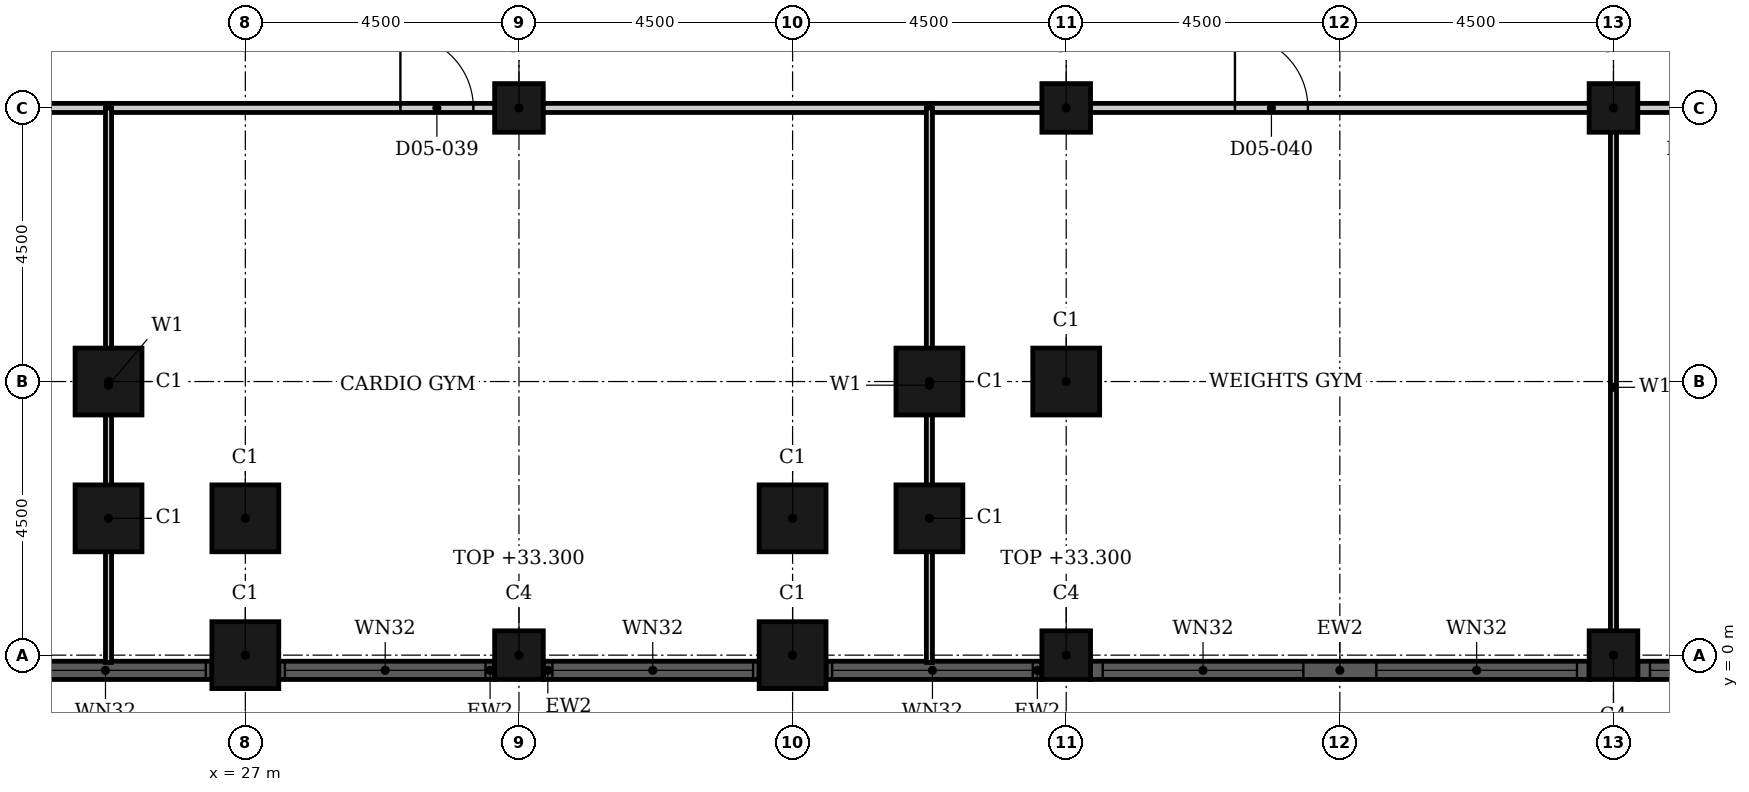
"""IFC4 building model, lengths in metres.
Left out: names, types, materials, properties, quantities, classifications, styles, units other than length and angle.
Written with IfcOpenShell. Run it as: python <this file> out.ifc"""

import sys

from ifc_helpers import new_model, si_unit, direction, frame, frame_2d, origin, origin_2d, place, context, subcontext, project, spatial, rectangle, hollow_rectangle, extrude, element, fill, save


model = new_model("IFC4")
c1 = context("Model", 3, precision=1e-05, world=origin(), true_north=direction((0.0, 1.0)))
c2 = subcontext(c1, "Body", "Model", "MODEL_VIEW")
j1 = project(units=[si_unit("LENGTHUNIT", "METRE"), si_unit("PLANEANGLEUNIT", "RADIAN")], contexts=[c1])
p1 = place(None, origin())
s1 = spatial("IfcSite", under=j1, at=p1, CompositionType="ELEMENT")
p2 = place(p1, origin())
s2 = spatial("IfcBuilding", under=s1, at=p2, CompositionType="ELEMENT")
p3 = place(p2, frame((0.0, 0.0, 28.8)))
s3 = spatial("IfcBuildingStorey", under=s2, at=p3, CompositionType="ELEMENT", Elevation=28.8)
for number, where, z_axis, x_axis in (
    (1, (24.75, 4.5, 0.0), (0.0, 0.0, 1.0), (1.0, 0.0, 0.0)),
    (2, (24.75, 2.25, 0.0), (0.0, 0.0, 1.0), (1.0, 0.0, 0.0)),
    (3, (27.0, 2.25, 0.0), (0.0, 0.0, 1.0), (1.0, 0.0, 0.0)),
    (4, (27.0, 0.0, 0.0), (0.0, 0.0, 1.0), (1.0, 0.0, 0.0)),
    (5, (36.0, 0.0, 0.0), (0.0, 0.0, 1.0), (1.0, 0.0, 0.0)),
    (6, (36.0, 2.25, 0.0), (0.0, 0.0, 1.0), (1.0, 0.0, 0.0)),
    (7, (38.25, 2.25, 0.0), (0.0, 0.0, 1.0), (1.0, 0.0, 0.0)),
    (8, (38.25, 4.5, 0.0), (0.0, 0.0, 1.0), (1.0, 0.0, 0.0)),
    (9, (40.5, 4.5, 0.0), (0.0, 0.0, 1.0), (1.0, 0.0, 0.0)),
):
    element("IfcColumn", number, at=place(p3, frame(where, z_axis=z_axis, x_axis=x_axis)), inside=s3, PredefinedType="COLUMN", context=c2, shape_type="SweptSolid", body=[
        extrude(hollow_rectangle(XDim=1.1, YDim=1.1, WallThickness=0.036, at=origin_2d()), origin(), (0.0, 0.0, 1.0), 4.8),
    ])
for number, where, z_axis, x_axis in (
    (10, (31.5, 0.0, 0.0), (0.0, 0.0, 1.0), (1.0, 0.0, 0.0)),
    (11, (40.5, 0.0, 0.0), (0.0, 0.0, 1.0), (1.0, 0.0, 0.0)),
    (12, (49.5, 0.0, 0.0), (0.0, 0.0, 1.0), (1.0, 0.0, 0.0)),
    (13, (31.5, 9.0, 0.0), (0.0, 0.0, 1.0), (1.0, 0.0, 0.0)),
    (14, (40.5, 9.0, 0.0), (0.0, 0.0, 1.0), (1.0, 0.0, 0.0)),
    (15, (49.5, 9.0, 0.0), (0.0, 0.0, 1.0), (1.0, 0.0, 0.0)),
):
    element("IfcColumn", number, at=place(p3, frame(where, z_axis=z_axis, x_axis=x_axis)), inside=s3, PredefinedType="COLUMN", context=c2, shape_type="SweptSolid", body=[
        extrude(hollow_rectangle(XDim=0.8, YDim=0.8, WallThickness=0.025, at=origin_2d()), origin(), (0.0, 0.0, 1.0), 4.5),
    ])
p4 = place(p3, frame((22.9, -0.25, 0.0), z_axis=(0.0, 0.0, 1.0), x_axis=(1.0, 0.0, 0.0)))
e16 = element("IfcWall", 16, at=p4, inside=s3, PredefinedType="SOLIDWALL", context=c2, shape_type="SweptSolid", body=[
    extrude(rectangle(XDim=3.55, YDim=0.3, at=frame_2d((1.775, 0.0))), origin(), (0.0, 0.0, 1.0), 4.8),
])
p5 = place(p4, frame((0.15, 0.0, 0.9)))
e17 = element("IfcOpeningElement", 17, at=p5, cuts=e16, PredefinedType="OPENING", context=c2, shape_type="SweptSolid", body=[
    extrude(rectangle(XDim=3.3, YDim=2.9, at=frame_2d((1.65, 1.45))), frame((0.0, 0.16, 0.0), z_axis=(0.0, -1.0, 0.0), x_axis=(1.0, 0.0, 0.0)), (0.0, 0.0, 1.0), 0.32),
])
p6 = place(p3, frame((27.55, -0.25, 0.0), z_axis=(0.0, 0.0, 1.0), x_axis=(1.0, 0.0, 0.0)))
e18 = element("IfcWall", 18, at=p6, inside=s3, PredefinedType="SOLIDWALL", context=c2, shape_type="SweptSolid", body=[
    extrude(rectangle(XDim=3.55, YDim=0.3, at=frame_2d((1.775, 0.0))), origin(), (0.0, 0.0, 1.0), 4.8),
])
p7 = place(p6, frame((0.1, 0.0, 0.9)))
e19 = element("IfcOpeningElement", 19, at=p7, cuts=e18, PredefinedType="OPENING", context=c2, shape_type="SweptSolid", body=[
    extrude(rectangle(XDim=3.3, YDim=2.9, at=frame_2d((1.65, 1.45))), frame((0.0, 0.16, 0.0), z_axis=(0.0, -1.0, 0.0), x_axis=(1.0, 0.0, 0.0)), (0.0, 0.0, 1.0), 0.32),
])
p8 = place(p3, frame((31.9, -0.25, 0.0), z_axis=(0.0, 0.0, 1.0), x_axis=(1.0, 0.0, 0.0)))
e20 = element("IfcWall", 20, at=p8, inside=s3, PredefinedType="SOLIDWALL", context=c2, shape_type="SweptSolid", body=[
    extrude(rectangle(XDim=3.55, YDim=0.3, at=frame_2d((1.775, 0.0))), origin(), (0.0, 0.0, 1.0), 4.8),
])
p9 = place(p8, frame((0.15, 0.0, 0.9)))
e21 = element("IfcOpeningElement", 21, at=p9, cuts=e20, PredefinedType="OPENING", context=c2, shape_type="SweptSolid", body=[
    extrude(rectangle(XDim=3.3, YDim=2.9, at=frame_2d((1.65, 1.45))), frame((0.0, 0.16, 0.0), z_axis=(0.0, -1.0, 0.0), x_axis=(1.0, 0.0, 0.0)), (0.0, 0.0, 1.0), 0.32),
])
p10 = place(p3, frame((36.55, -0.25, 0.0), z_axis=(0.0, 0.0, 1.0), x_axis=(1.0, 0.0, 0.0)))
e22 = element("IfcWall", 22, at=p10, inside=s3, PredefinedType="SOLIDWALL", context=c2, shape_type="SweptSolid", body=[
    extrude(rectangle(XDim=3.55, YDim=0.3, at=frame_2d((1.775, 0.0))), origin(), (0.0, 0.0, 1.0), 4.8),
])
p11 = place(p10, frame((0.1, 0.0, 0.9)))
e23 = element("IfcOpeningElement", 23, at=p11, cuts=e22, PredefinedType="OPENING", context=c2, shape_type="SweptSolid", body=[
    extrude(rectangle(XDim=3.3, YDim=2.9, at=frame_2d((1.65, 1.45))), frame((0.0, 0.16, 0.0), z_axis=(0.0, -1.0, 0.0), x_axis=(1.0, 0.0, 0.0)), (0.0, 0.0, 1.0), 0.32),
])
p12 = place(p3, frame((40.9, -0.25, 0.0), z_axis=(0.0, 0.0, 1.0), x_axis=(1.0, 0.0, 0.0)))
e24 = element("IfcWall", 24, at=p12, inside=s3, PredefinedType="SOLIDWALL", context=c2, shape_type="SweptSolid", body=[
    extrude(rectangle(XDim=8.2, YDim=0.3, at=frame_2d((4.1, 0.0))), origin(), (0.0, 0.0, 1.0), 4.8),
])
p13 = place(p12, frame((0.2, 0.0, 0.9)))
e25 = element("IfcOpeningElement", 25, at=p13, cuts=e24, PredefinedType="OPENING", context=c2, shape_type="SweptSolid", body=[
    extrude(rectangle(XDim=3.3, YDim=2.9, at=frame_2d((1.65, 1.45))), frame((0.0, 0.16, 0.0), z_axis=(0.0, -1.0, 0.0), x_axis=(1.0, 0.0, 0.0)), (0.0, 0.0, 1.0), 0.32),
])
p14 = place(p12, frame((4.7, 0.0, 0.9)))
e26 = element("IfcOpeningElement", 26, at=p14, cuts=e24, PredefinedType="OPENING", context=c2, shape_type="SweptSolid", body=[
    extrude(rectangle(XDim=3.3, YDim=2.9, at=frame_2d((1.65, 1.45))), frame((0.0, 0.16, 0.0), z_axis=(0.0, -1.0, 0.0), x_axis=(1.0, 0.0, 0.0)), (0.0, 0.0, 1.0), 0.32),
])
p15 = place(p3, frame((49.9, -0.25, 0.0), z_axis=(0.0, 0.0, 1.0), x_axis=(1.0, 0.0, 0.0)))
e27 = element("IfcWall", 27, at=p15, inside=s3, PredefinedType="SOLIDWALL", context=c2, shape_type="SweptSolid", body=[
    extrude(rectangle(XDim=8.2, YDim=0.3, at=frame_2d((4.1, 0.0))), origin(), (0.0, 0.0, 1.0), 4.8),
])
p16 = place(p15, frame((0.2, 0.0, 0.9)))
e28 = element("IfcOpeningElement", 28, at=p16, cuts=e27, PredefinedType="OPENING", context=c2, shape_type="SweptSolid", body=[
    extrude(rectangle(XDim=3.3, YDim=2.9, at=frame_2d((1.65, 1.45))), frame((0.0, 0.16, 0.0), z_axis=(0.0, -1.0, 0.0), x_axis=(1.0, 0.0, 0.0)), (0.0, 0.0, 1.0), 0.32),
])
p17 = place(p15, frame((4.7, 0.0, 0.9)))
e29 = element("IfcOpeningElement", 29, at=p17, cuts=e27, PredefinedType="OPENING", context=c2, shape_type="SweptSolid", body=[
    extrude(rectangle(XDim=3.3, YDim=2.9, at=frame_2d((1.65, 1.45))), frame((0.0, 0.16, 0.0), z_axis=(0.0, -1.0, 0.0), x_axis=(1.0, 0.0, 0.0)), (0.0, 0.0, 1.0), 0.32),
])
p18 = place(p3, frame((10.4, 9.0, 0.0), z_axis=(0.0, 0.0, 1.0), x_axis=(1.0, 0.0, 0.0)))
e30 = element("IfcWall", 30, at=p18, inside=s3, PredefinedType="PARTITIONING", context=c2, shape_type="SweptSolid", body=[
    extrude(rectangle(XDim=14.35, YDim=0.15, at=frame_2d((7.175, 0.0))), origin(), (0.0, 0.0, 1.0), 4.5),
])
p19 = place(p18, frame((6.575, 0.0, 0.0)))
e31 = element("IfcOpeningElement", 31, at=p19, cuts=e30, PredefinedType="OPENING", context=c2, shape_type="SweptSolid", body=[
    extrude(rectangle(XDim=1.2, YDim=2.4, at=frame_2d((0.6, 1.2))), frame((0.0, 0.085, 0.0), z_axis=(0.0, -1.0, 0.0), x_axis=(1.0, 0.0, 0.0)), (0.0, 0.0, 1.0), 0.17),
])
p20 = place(p3, frame((24.75, 9.0, 0.0), z_axis=(0.0, 0.0, 1.0), x_axis=(1.0, 0.0, 0.0)))
e32 = element("IfcWall", 32, at=p20, inside=s3, PredefinedType="PARTITIONING", context=c2, shape_type="SweptSolid", body=[
    extrude(rectangle(XDim=13.5, YDim=0.15, at=frame_2d((6.75, 0.0))), origin(), (0.0, 0.0, 1.0), 4.5),
])
p21 = place(p20, frame((4.8, 0.0, 0.0)))
e33 = element("IfcOpeningElement", 33, at=p21, cuts=e32, PredefinedType="OPENING", context=c2, shape_type="SweptSolid", body=[
    extrude(rectangle(XDim=1.2, YDim=2.4, at=frame_2d((0.6, 1.2))), frame((0.0, 0.085, 0.0), z_axis=(0.0, -1.0, 0.0), x_axis=(1.0, 0.0, 0.0)), (0.0, 0.0, 1.0), 0.17),
])
p22 = place(p3, frame((38.25, 9.0, 0.0), z_axis=(0.0, 0.0, 1.0), x_axis=(1.0, 0.0, 0.0)))
e34 = element("IfcWall", 34, at=p22, inside=s3, PredefinedType="PARTITIONING", context=c2, shape_type="SweptSolid", body=[
    extrude(rectangle(XDim=11.25, YDim=0.15, at=frame_2d((5.625, 0.0))), origin(), (0.0, 0.0, 1.0), 4.5),
])
p23 = place(p22, frame((5.025, 0.0, 0.0)))
e35 = element("IfcOpeningElement", 35, at=p23, cuts=e34, PredefinedType="OPENING", context=c2, shape_type="SweptSolid", body=[
    extrude(rectangle(XDim=1.2, YDim=2.4, at=frame_2d((0.6, 1.2))), frame((0.0, 0.085, 0.0), z_axis=(0.0, -1.0, 0.0), x_axis=(1.0, 0.0, 0.0)), (0.0, 0.0, 1.0), 0.17),
])
p24 = place(p3, frame((49.5, 9.0, 0.0), z_axis=(0.0, 0.0, 1.0), x_axis=(1.0, 0.0, 0.0)))
e36 = element("IfcWall", 36, at=p24, inside=s3, PredefinedType="PARTITIONING", context=c2, shape_type="SweptSolid", body=[
    extrude(rectangle(XDim=3.1, YDim=0.15, at=frame_2d((1.55, 0.0))), origin(), (0.0, 0.0, 1.0), 4.5),
])
p25 = place(p24, frame((0.95, 0.0, 0.0)))
e37 = element("IfcOpeningElement", 37, at=p25, cuts=e36, PredefinedType="OPENING", context=c2, shape_type="SweptSolid", body=[
    extrude(rectangle(XDim=1.2, YDim=2.4, at=frame_2d((0.6, 1.2))), frame((0.0, 0.085, 0.0), z_axis=(0.0, -1.0, 0.0), x_axis=(1.0, 0.0, 0.0)), (0.0, 0.0, 1.0), 0.17),
])
for number, where, z_axis, x_axis in (
    (38, (24.75, -0.12, 0.0), (0.0, 0.0, 1.0), (0.0, 1.0, 0.0)),
    (39, (38.25, -0.12, 0.0), (0.0, 0.0, 1.0), (0.0, 1.0, 0.0)),
):
    element("IfcWall", number, at=place(p3, frame(where, z_axis=z_axis, x_axis=x_axis)), inside=s3, PredefinedType="PARTITIONING", context=c2, shape_type="SweptSolid", body=[
        extrude(rectangle(XDim=9.12, YDim=0.1, at=frame_2d((4.56, 0.0))), origin(), (0.0, 0.0, 1.0), 3.88),
    ])
p26 = place(p3, frame((49.5, -0.19, 0.0), z_axis=(0.0, 0.0, 1.0), x_axis=(0.0, 1.0, 0.0)))
e40 = element("IfcWall", 40, at=p26, inside=s3, PredefinedType="PARTITIONING", context=c2, shape_type="SweptSolid", body=[
    extrude(rectangle(XDim=9.19, YDim=0.1, at=frame_2d((4.595, 0.0))), origin(), (0.0, 0.0, 1.0), 4.5),
])
p27 = place(p5, origin())
e41 = element("IfcWindow", 41, at=p27, inside=s3, PartitioningType="SINGLE_PANEL", PredefinedType="WINDOW", context=c2, shape_type="SweptSolid", body=[
    extrude(rectangle(XDim=3.3, YDim=2.9, at=frame_2d((1.65, 1.45))), frame((0.0, 0.03, 0.0), z_axis=(0.0, -1.0, 0.0), x_axis=(1.0, 0.0, 0.0)), (0.0, 0.0, 1.0), 0.06),
])
fill(e17, e41)
p28 = place(p7, origin())
e42 = element("IfcWindow", 42, at=p28, inside=s3, PartitioningType="SINGLE_PANEL", PredefinedType="WINDOW", context=c2, shape_type="SweptSolid", body=[
    extrude(rectangle(XDim=3.3, YDim=2.9, at=frame_2d((1.65, 1.45))), frame((0.0, 0.03, 0.0), z_axis=(0.0, -1.0, 0.0), x_axis=(1.0, 0.0, 0.0)), (0.0, 0.0, 1.0), 0.06),
])
fill(e19, e42)
p29 = place(p9, origin())
e43 = element("IfcWindow", 43, at=p29, inside=s3, PartitioningType="SINGLE_PANEL", PredefinedType="WINDOW", context=c2, shape_type="SweptSolid", body=[
    extrude(rectangle(XDim=3.3, YDim=2.9, at=frame_2d((1.65, 1.45))), frame((0.0, 0.03, 0.0), z_axis=(0.0, -1.0, 0.0), x_axis=(1.0, 0.0, 0.0)), (0.0, 0.0, 1.0), 0.06),
])
fill(e21, e43)
p30 = place(p11, origin())
e44 = element("IfcWindow", 44, at=p30, inside=s3, PartitioningType="SINGLE_PANEL", PredefinedType="WINDOW", context=c2, shape_type="SweptSolid", body=[
    extrude(rectangle(XDim=3.3, YDim=2.9, at=frame_2d((1.65, 1.45))), frame((0.0, 0.03, 0.0), z_axis=(0.0, -1.0, 0.0), x_axis=(1.0, 0.0, 0.0)), (0.0, 0.0, 1.0), 0.06),
])
fill(e23, e44)
p31 = place(p13, origin())
e45 = element("IfcWindow", 45, at=p31, inside=s3, PartitioningType="SINGLE_PANEL", PredefinedType="WINDOW", context=c2, shape_type="SweptSolid", body=[
    extrude(rectangle(XDim=3.3, YDim=2.9, at=frame_2d((1.65, 1.45))), frame((0.0, 0.03, 0.0), z_axis=(0.0, -1.0, 0.0), x_axis=(1.0, 0.0, 0.0)), (0.0, 0.0, 1.0), 0.06),
])
fill(e25, e45)
p32 = place(p14, origin())
e46 = element("IfcWindow", 46, at=p32, inside=s3, PartitioningType="SINGLE_PANEL", PredefinedType="WINDOW", context=c2, shape_type="SweptSolid", body=[
    extrude(rectangle(XDim=3.3, YDim=2.9, at=frame_2d((1.65, 1.45))), frame((0.0, 0.03, 0.0), z_axis=(0.0, -1.0, 0.0), x_axis=(1.0, 0.0, 0.0)), (0.0, 0.0, 1.0), 0.06),
])
fill(e26, e46)
p33 = place(p16, origin())
e47 = element("IfcWindow", 47, at=p33, inside=s3, PartitioningType="SINGLE_PANEL", PredefinedType="WINDOW", context=c2, shape_type="SweptSolid", body=[
    extrude(rectangle(XDim=3.3, YDim=2.9, at=frame_2d((1.65, 1.45))), frame((0.0, 0.03, 0.0), z_axis=(0.0, -1.0, 0.0), x_axis=(1.0, 0.0, 0.0)), (0.0, 0.0, 1.0), 0.06),
])
fill(e28, e47)
p34 = place(p21, origin())
e48 = element("IfcDoor", 48, at=p34, inside=s3, OperationType="SINGLE_SWING_LEFT", PredefinedType="DOOR", context=c2, shape_type="SweptSolid", body=[
    extrude(rectangle(XDim=1.2, YDim=2.4, at=frame_2d((0.6, 1.2))), frame((0.0, 0.025, 0.0), z_axis=(0.0, -1.0, 0.0), x_axis=(1.0, 0.0, 0.0)), (0.0, 0.0, 1.0), 0.05),
])
fill(e33, e48)
p35 = place(p23, origin())
e49 = element("IfcDoor", 49, at=p35, inside=s3, OperationType="SINGLE_SWING_LEFT", PredefinedType="DOOR", context=c2, shape_type="SweptSolid", body=[
    extrude(rectangle(XDim=1.2, YDim=2.4, at=frame_2d((0.6, 1.2))), frame((0.0, 0.025, 0.0), z_axis=(0.0, -1.0, 0.0), x_axis=(1.0, 0.0, 0.0)), (0.0, 0.0, 1.0), 0.05),
])
fill(e35, e49)
save(model, sys.argv[1])
